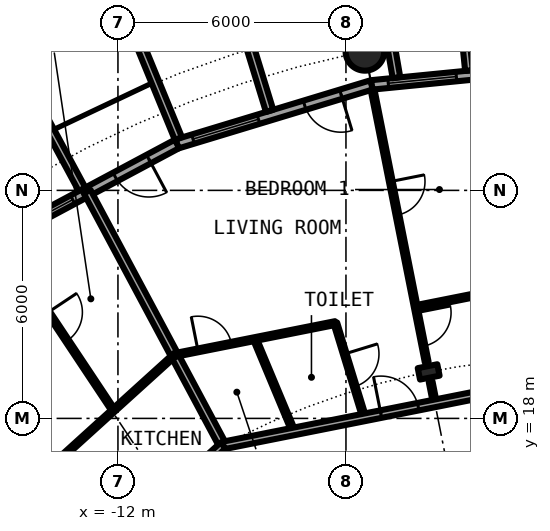
"""IFC4 building model, lengths in metres.
Left out: names, types, materials, properties, quantities, classifications, styles, units other than length and angle.
Written with IfcOpenShell. Run it as: python <this file> out.ifc"""

import sys

from ifc_helpers import new_model, si_unit, direction, frame, frame_2d, origin, origin_2d, place, context, subcontext, project, spatial, rectangle, hollow_circle, i_section, extrude, element, fill, save


model = new_model("IFC4")
c1 = context("Model", 3, precision=1e-05, world=origin(), true_north=direction((0.0, 1.0)))
c2 = subcontext(c1, "Body", "Model", "MODEL_VIEW")
j1 = project(units=[si_unit("LENGTHUNIT", "METRE"), si_unit("PLANEANGLEUNIT", "RADIAN")], contexts=[c1])
p1 = place(None, origin())
s1 = spatial("IfcSite", under=j1, at=p1, CompositionType="ELEMENT")
p2 = place(p1, origin())
s2 = spatial("IfcBuilding", under=s1, at=p2, CompositionType="ELEMENT")
p3 = place(p2, frame((0.0, 0.0, 63.6)))
s3 = spatial("IfcBuildingStorey", under=s2, at=p3, CompositionType="ELEMENT", Elevation=63.6)
p4 = place(p3, frame((-5.501, 27.658, 0.0), z_axis=(0.0, 0.0, 1.0), x_axis=(1.0, 0.0, 0.0)))
e1 = element("IfcColumn", 1, at=p4, inside=s3, PredefinedType="COLUMN", context=c2, shape_type="SweptSolid", body=[
    extrude(hollow_circle(Radius=0.508, WallThickness=0.04, at=origin_2d()), origin(), (0.0, 0.0, 1.0), 3.05),
])
p5 = place(p3, frame((-3.824, 19.223, 0.0), z_axis=(0.0, 0.0, 1.0), x_axis=(-0.195090322016, 0.980785280403, 0.0)))
e2 = element("IfcColumn", 2, at=p5, inside=s3, PredefinedType="COLUMN", context=c2, shape_type="SweptSolid", body=[
    extrude(i_section(OverallWidth=0.306, OverallDepth=0.524, WebThickness=0.021, FlangeThickness=0.04, FilletRadius=0.027, at=origin_2d()), origin(), (0.0, 0.0, 1.0), 3.05),
])
p6 = place(p3, frame((0.0, 27.3, 0.0), z_axis=(0.0, 0.0, 1.0), x_axis=(-0.995173996315, -0.098126026407, 0.0)))
e3 = element("IfcWall", 3, at=p6, inside=s3, PredefinedType="SOLIDWALL", context=c2, shape_type="SweptSolid", body=[
    extrude(rectangle(XDim=5.352, YDim=0.25, at=frame_2d((2.676, 0.0))), origin(), (0.0, 0.0, 1.0), 2.7),
])
p7 = place(p6, frame((0.841, 0.0, 0.0)))
e4 = element("IfcOpeningElement", 4, at=p7, cuts=e3, PredefinedType="OPENING", context=c2, shape_type="SweptSolid", body=[
    extrude(rectangle(XDim=1.0, YDim=2.2, at=frame_2d((0.5, 1.1))), frame((0.0, 0.135, 0.0), z_axis=(0.0, -1.0, 0.0), x_axis=(1.0, 0.0, 0.0)), (0.0, 0.0, 1.0), 0.27),
])
p8 = place(p6, frame((3.111, 0.0, 0.3)))
e5 = element("IfcOpeningElement", 5, at=p8, cuts=e3, PredefinedType="OPENING", context=c2, shape_type="SweptSolid", body=[
    extrude(rectangle(XDim=1.8, YDim=2.1, at=frame_2d((0.9, 1.05))), frame((0.0, 0.135, 0.0), z_axis=(0.0, -1.0, 0.0), x_axis=(1.0, 0.0, 0.0)), (0.0, 0.0, 1.0), 0.27),
])
p9 = place(p3, frame((-2.764, 27.153, -0.03), z_axis=(0.0, 0.0, 1.0), x_axis=(-0.101505487237, 0.994834979311, 0.0)))
e6 = element("IfcWall", 6, at=p9, inside=s3, PredefinedType="SOLIDWALL", context=c2, shape_type="SweptSolid", body=[
    extrude(rectangle(XDim=3.007, YDim=0.2, at=frame_2d((1.503, 0.0))), origin(), (0.0, 0.0, 1.0), 2.73),
])
p10 = place(p3, frame((-4.671, 26.966, -0.03), z_axis=(0.0, 0.0, 1.0), x_axis=(-0.170539878907, 0.985350774954, 0.0)))
e7 = element("IfcWall", 7, at=p10, inside=s3, PredefinedType="SOLIDWALL", context=c2, shape_type="SweptSolid", body=[
    extrude(rectangle(XDim=2.932, YDim=0.2, at=frame_2d((1.466, 0.0))), origin(), (0.0, 0.0, 1.0), 2.73),
])
p11 = place(p3, frame((-5.326, 26.775, 0.0), z_axis=(0.0, 0.0, 1.0), x_axis=(-0.956965678721, -0.290201119486, 0.0)))
e8 = element("IfcWall", 8, at=p11, inside=s3, PredefinedType="SOLIDWALL", context=c2, shape_type="SweptSolid", body=[
    extrude(rectangle(XDim=5.351, YDim=0.25, at=frame_2d((2.676, 0.0))), origin(), (0.0, 0.0, 1.0), 2.7),
])
p12 = place(p11, frame((0.841, 0.0, 0.0)))
e9 = element("IfcOpeningElement", 9, at=p12, cuts=e8, PredefinedType="OPENING", context=c2, shape_type="SweptSolid", body=[
    extrude(rectangle(XDim=1.0, YDim=2.2, at=frame_2d((0.5, 1.1))), frame((0.0, 0.135, 0.0), z_axis=(0.0, -1.0, 0.0), x_axis=(1.0, 0.0, 0.0)), (0.0, 0.0, 1.0), 0.27),
])
p13 = place(p11, frame((3.111, 0.0, 0.3)))
e10 = element("IfcOpeningElement", 10, at=p13, cuts=e8, PredefinedType="OPENING", context=c2, shape_type="SweptSolid", body=[
    extrude(rectangle(XDim=1.8, YDim=2.1, at=frame_2d((0.9, 1.05))), frame((0.0, 0.135, 0.0), z_axis=(0.0, -1.0, 0.0), x_axis=(1.0, 0.0, 0.0)), (0.0, 0.0, 1.0), 0.27),
])
p14 = place(p3, frame((-8.009, 26.092, -0.03), z_axis=(0.0, 0.0, 1.0), x_axis=(-0.293406695073, 0.955987715029, 0.0)))
e11 = element("IfcWall", 11, at=p14, inside=s3, PredefinedType="SOLIDWALL", context=c2, shape_type="SweptSolid", body=[
    extrude(rectangle(XDim=3.006, YDim=0.2, at=frame_2d((1.503, 0.0))), origin(), (0.0, 0.0, 1.0), 2.73),
])
p15 = place(p3, frame((-10.409, 25.364, -0.03), z_axis=(0.0, 0.0, 1.0), x_axis=(-0.379509886562, 0.925187681501, 0.0)))
e12 = element("IfcWall", 12, at=p15, inside=s3, PredefinedType="SOLIDWALL", context=c2, shape_type="SweptSolid", body=[
    extrude(rectangle(XDim=2.883, YDim=0.2, at=frame_2d((1.441, 0.0))), origin(), (0.0, 0.0, 1.0), 2.73),
])
p16 = place(p3, frame((-10.447, 25.222, 0.0), z_axis=(0.0, 0.0, 1.0), x_axis=(-0.881915646801, -0.471407246368, 0.0)))
e13 = element("IfcWall", 13, at=p16, inside=s3, PredefinedType="SOLIDWALL", context=c2, shape_type="SweptSolid", body=[
    extrude(rectangle(XDim=5.352, YDim=0.25, at=frame_2d((2.676, 0.0))), origin(), (0.0, 0.0, 1.0), 2.7),
])
p17 = place(p16, frame((0.841, 0.0, 0.0)))
e14 = element("IfcOpeningElement", 14, at=p17, cuts=e13, PredefinedType="OPENING", context=c2, shape_type="SweptSolid", body=[
    extrude(rectangle(XDim=1.0, YDim=2.2, at=frame_2d((0.5, 1.1))), frame((0.0, 0.135, 0.0), z_axis=(0.0, -1.0, 0.0), x_axis=(1.0, 0.0, 0.0)), (0.0, 0.0, 1.0), 0.27),
])
p18 = place(p16, frame((3.111, 0.0, 0.3)))
e15 = element("IfcOpeningElement", 15, at=p18, cuts=e13, PredefinedType="OPENING", context=c2, shape_type="SweptSolid", body=[
    extrude(rectangle(XDim=1.8, YDim=2.1, at=frame_2d((0.9, 1.05))), frame((0.0, 0.135, 0.0), z_axis=(0.0, -1.0, 0.0), x_axis=(1.0, 0.0, 0.0)), (0.0, 0.0, 1.0), 0.27),
])
p19 = place(p3, frame((-12.945, 24.029, -0.03), z_axis=(0.0, 0.0, 1.0), x_axis=(-0.474424310775, 0.88029629861, 0.0)))
e16 = element("IfcWall", 16, at=p19, inside=s3, PredefinedType="SOLIDWALL", context=c2, shape_type="SweptSolid", body=[
    extrude(rectangle(XDim=3.006, YDim=0.2, at=frame_2d((1.503, 0.0))), origin(), (0.0, 0.0, 1.0), 2.73),
])
p20 = place(p3, frame((-17.219, 21.023, 0.0), z_axis=(0.0, 0.0, 1.0), x_axis=(0.633664062855, -0.773608334654, 0.0)))
e17 = element("IfcWall", 17, at=p20, inside=s3, PredefinedType="PARTITIONING", context=c2, shape_type="SweptSolid", body=[
    extrude(rectangle(XDim=8.138, YDim=0.1, at=frame_2d((4.069, 0.0))), origin(), (0.0, 0.0, 1.0), 2.7),
])
p21 = place(p20, frame((6.377, 0.0, 0.0)))
e18 = element("IfcOpeningElement", 18, at=p21, cuts=e17, PredefinedType="OPENING", context=c2, shape_type="SweptSolid", body=[
    extrude(rectangle(XDim=0.9, YDim=2.3, at=frame_2d((0.45, 1.15))), frame((0.0, 0.06, 0.0), z_axis=(0.0, -1.0, 0.0), x_axis=(1.0, 0.0, 0.0)), (0.0, 0.0, 1.0), 0.12),
])
p22 = place(p20, frame((2.308, 0.0, 0.0)))
e19 = element("IfcOpeningElement", 19, at=p22, cuts=e17, PredefinedType="OPENING", context=c2, shape_type="SweptSolid", body=[
    extrude(rectangle(XDim=0.9, YDim=2.3, at=frame_2d((0.45, 1.15))), frame((0.0, 0.06, 0.0), z_axis=(0.0, -1.0, 0.0), x_axis=(1.0, 0.0, 0.0)), (0.0, 0.0, 1.0), 0.12),
])
p23 = place(p3, frame((-15.054, 22.624, 0.0), z_axis=(0.0, 0.0, 1.0), x_axis=(0.553913391217, -0.832574294, 0.0)))
e20 = element("IfcWall", 20, at=p23, inside=s3, PredefinedType="PARTITIONING", context=c2, shape_type="SweptSolid", body=[
    extrude(rectangle(XDim=5.301, YDim=0.1, at=frame_2d((2.65, 0.0))), origin(), (0.0, 0.0, 1.0), 2.7),
])
p24 = place(p23, frame((2.2, 0.0, 0.0)))
e21 = element("IfcOpeningElement", 21, at=p24, cuts=e20, PredefinedType="OPENING", context=c2, shape_type="SweptSolid", body=[
    extrude(rectangle(XDim=0.9, YDim=2.3, at=frame_2d((0.45, 1.15))), frame((0.0, 0.06, 0.0), z_axis=(0.0, -1.0, 0.0), x_axis=(1.0, 0.0, 0.0)), (0.0, 0.0, 1.0), 0.12),
])
p25 = place(p3, frame((-12.81, 23.966, 0.0), z_axis=(0.0, 0.0, 1.0), x_axis=(0.471439510802, -0.881898399848, 0.0)))
e22 = element("IfcWall", 22, at=p25, inside=s3, PredefinedType="PARTITIONING", context=c2, shape_type="SweptSolid", body=[
    extrude(rectangle(XDim=7.575, YDim=0.2, at=frame_2d((3.787, 0.0))), origin(), (0.0, 0.0, 1.0), 2.7),
])
p26 = place(p3, frame((-8.396, 20.088, 0.0), z_axis=(0.0, 0.0, 1.0), x_axis=(0.385844829344, -0.922563693014, 0.0)))
e23 = element("IfcWall", 23, at=p26, inside=s3, PredefinedType="PARTITIONING", context=c2, shape_type="SweptSolid", body=[
    extrude(rectangle(XDim=2.636, YDim=0.1, at=frame_2d((1.318, 0.0))), origin(), (0.0, 0.0, 1.0), 2.7),
])
p27 = place(p3, frame((-5.301, 26.653, 0.0), z_axis=(0.0, 0.0, 1.0), x_axis=(0.194986141751, -0.980805997395, 0.0)))
e24 = element("IfcWall", 24, at=p27, inside=s3, PredefinedType="PARTITIONING", context=c2, shape_type="SweptSolid", body=[
    extrude(rectangle(XDim=7.313, YDim=0.1, at=frame_2d((3.657, 0.0))), origin(), (0.0, 0.0, 1.0), 2.7),
])
p28 = place(p27, frame((5.985, 0.0, 0.0)))
e25 = element("IfcOpeningElement", 25, at=p28, cuts=e24, PredefinedType="OPENING", context=c2, shape_type="SweptSolid", body=[
    extrude(rectangle(XDim=0.9, YDim=2.3, at=frame_2d((0.45, 1.15))), frame((0.0, 0.06, 0.0), z_axis=(0.0, -1.0, 0.0), x_axis=(1.0, 0.0, 0.0)), (0.0, 0.0, 1.0), 0.12),
])
p29 = place(p27, frame((2.467, 0.0, 0.0)))
e26 = element("IfcOpeningElement", 26, at=p29, cuts=e24, PredefinedType="OPENING", context=c2, shape_type="SweptSolid", body=[
    extrude(rectangle(XDim=0.9, YDim=2.3, at=frame_2d((0.45, 1.15))), frame((0.0, 0.06, 0.0), z_axis=(0.0, -1.0, 0.0), x_axis=(1.0, 0.0, 0.0)), (0.0, 0.0, 1.0), 0.12),
])
p30 = place(p3, frame((-3.772, 18.966, 0.0), z_axis=(0.0, 0.0, 1.0), x_axis=(0.194500150765, -0.980902488198, 0.0)))
e27 = element("IfcWall", 27, at=p30, inside=s3, PredefinedType="PARTITIONING", context=c2, shape_type="SweptSolid", body=[
    extrude(rectangle(XDim=0.581, YDim=0.1, at=frame_2d((0.291, 0.0))), origin(), (0.0, 0.0, 1.0), 2.7),
])
p31 = place(p3, frame((-6.28, 20.509, 0.0), z_axis=(0.0, 0.0, 1.0), x_axis=(0.293008940941, -0.956109701095, 0.0)))
e28 = element("IfcWall", 28, at=p31, inside=s3, PredefinedType="PARTITIONING", context=c2, shape_type="SweptSolid", body=[
    extrude(rectangle(XDim=2.597, YDim=0.1, at=frame_2d((1.299, 0.0))), origin(), (0.0, 0.0, 1.0), 2.7),
])
p32 = place(p31, frame((0.849, 0.0, 0.0)))
e29 = element("IfcOpeningElement", 29, at=p32, cuts=e28, PredefinedType="OPENING", context=c2, shape_type="SweptSolid", body=[
    extrude(rectangle(XDim=0.9, YDim=2.3, at=frame_2d((0.45, 1.15))), frame((0.0, 0.06, 0.0), z_axis=(0.0, -1.0, 0.0), x_axis=(1.0, 0.0, 0.0)), (0.0, 0.0, 1.0), 0.12),
])
p33 = place(p3, frame((-9.239, 17.286, 0.0), z_axis=(0.0, 0.0, 1.0), x_axis=(0.98077905287, 0.195121627328, 0.0)))
e30 = element("IfcWall", 30, at=p33, inside=s3, PredefinedType="PARTITIONING", context=c2, shape_type="SweptSolid", body=[
    extrude(rectangle(XDim=11.379, YDim=0.2, at=frame_2d((5.689, 0.0))), origin(), (0.0, 0.0, 1.0), 2.38),
])
p34 = place(p33, frame((4.241, 0.0, 0.0)))
e31 = element("IfcOpeningElement", 31, at=p34, cuts=e30, PredefinedType="OPENING", context=c2, shape_type="SweptSolid", body=[
    extrude(rectangle(XDim=1.0, YDim=2.3, at=frame_2d((0.5, 1.15))), frame((0.0, 0.11, 0.0), z_axis=(0.0, -1.0, 0.0), x_axis=(1.0, 0.0, 0.0)), (0.0, 0.0, 1.0), 0.22),
])
p35 = place(p3, frame((-16.18, 10.995, 0.0), z_axis=(0.0, 0.0, 1.0), x_axis=(0.741086986457, 0.671409024741, 0.0)))
e32 = element("IfcWall", 32, at=p35, inside=s3, PredefinedType="PARTITIONING", context=c2, shape_type="SweptSolid", body=[
    extrude(rectangle(XDim=9.373, YDim=0.2, at=frame_2d((4.687, 0.0))), origin(), (0.0, 0.0, 1.0), 2.38),
])
p36 = place(p35, frame((4.115, 0.0, 0.0)))
e33 = element("IfcOpeningElement", 33, at=p36, cuts=e32, PredefinedType="OPENING", context=c2, shape_type="SweptSolid", body=[
    extrude(rectangle(XDim=1.0, YDim=2.3, at=frame_2d((0.5, 1.15))), frame((0.0, 0.11, 0.0), z_axis=(0.0, -1.0, 0.0), x_axis=(1.0, 0.0, 0.0)), (0.0, 0.0, 1.0), 0.22),
])
p37 = place(p3, frame((-10.511, 19.667, 0.0), z_axis=(0.0, 0.0, 1.0), x_axis=(0.980773878384, 0.195147635084, 0.0)))
e34 = element("IfcWall", 34, at=p37, inside=s3, PredefinedType="PARTITIONING", context=c2, shape_type="SweptSolid", body=[
    extrude(rectangle(XDim=4.315, YDim=0.1, at=frame_2d((2.157, 0.0))), origin(), (0.0, 0.0, 1.0), 2.7),
])
p38 = place(p37, frame((0.628, 0.0, 0.0)))
e35 = element("IfcOpeningElement", 35, at=p38, cuts=e34, PredefinedType="OPENING", context=c2, shape_type="SweptSolid", body=[
    extrude(rectangle(XDim=0.9, YDim=2.3, at=frame_2d((0.45, 1.15))), frame((0.0, 0.06, 0.0), z_axis=(0.0, -1.0, 0.0), x_axis=(1.0, 0.0, 0.0)), (0.0, 0.0, 1.0), 0.12),
])
p39 = place(p3, frame((-4.163, 20.93, 0.0), z_axis=(0.0, 0.0, 1.0), x_axis=(0.98077745026, 0.195129682675, 0.0)))
e36 = element("IfcWall", 36, at=p39, inside=s3, PredefinedType="PARTITIONING", context=c2, shape_type="SweptSolid", body=[
    extrude(rectangle(XDim=6.474, YDim=0.1, at=frame_2d((3.237, 0.0))), origin(), (0.0, 0.0, 1.0), 2.7),
])
p40 = place(p3, frame((-13.724, 16.755, 0.0), z_axis=(0.0, 0.0, 1.0), x_axis=(0.741022791884, 0.671479874537, 0.0)))
e37 = element("IfcWall", 37, at=p40, inside=s3, PredefinedType="PARTITIONING", context=c2, shape_type="SweptSolid", body=[
    extrude(rectangle(XDim=4.343, YDim=0.1, at=frame_2d((2.171, 0.0))), origin(), (0.0, 0.0, 1.0), 2.7),
])
p41 = place(p8, origin())
e38 = element("IfcWindow", 38, at=p41, inside=s3, PartitioningType="SINGLE_PANEL", PredefinedType="WINDOW", context=c2, shape_type="SweptSolid", body=[
    extrude(rectangle(XDim=1.8, YDim=2.1, at=frame_2d((0.9, 1.05))), frame((0.0, 0.03, 0.0), z_axis=(0.0, -1.0, 0.0), x_axis=(1.0, 0.0, 0.0)), (0.0, 0.0, 1.0), 0.06),
])
fill(e5, e38)
p42 = place(p12, origin())
e39 = element("IfcDoor", 39, at=p42, inside=s3, OperationType="SINGLE_SWING_LEFT", PredefinedType="DOOR", context=c2, shape_type="SweptSolid", body=[
    extrude(rectangle(XDim=1.0, YDim=2.2, at=frame_2d((0.5, 1.1))), frame((0.0, 0.025, 0.0), z_axis=(0.0, -1.0, 0.0), x_axis=(1.0, 0.0, 0.0)), (0.0, 0.0, 1.0), 0.05),
])
fill(e9, e39)
p43 = place(p13, origin())
e40 = element("IfcWindow", 40, at=p43, inside=s3, PartitioningType="SINGLE_PANEL", PredefinedType="WINDOW", context=c2, shape_type="SweptSolid", body=[
    extrude(rectangle(XDim=1.8, YDim=2.1, at=frame_2d((0.9, 1.05))), frame((0.0, 0.03, 0.0), z_axis=(0.0, -1.0, 0.0), x_axis=(1.0, 0.0, 0.0)), (0.0, 0.0, 1.0), 0.06),
])
fill(e10, e40)
p44 = place(p17, origin())
e41 = element("IfcDoor", 41, at=p44, inside=s3, OperationType="SINGLE_SWING_LEFT", PredefinedType="DOOR", context=c2, shape_type="SweptSolid", body=[
    extrude(rectangle(XDim=1.0, YDim=2.2, at=frame_2d((0.5, 1.1))), frame((0.0, 0.025, 0.0), z_axis=(0.0, -1.0, 0.0), x_axis=(1.0, 0.0, 0.0)), (0.0, 0.0, 1.0), 0.05),
])
fill(e14, e41)
p45 = place(p18, origin())
e42 = element("IfcWindow", 42, at=p45, inside=s3, PartitioningType="SINGLE_PANEL", PredefinedType="WINDOW", context=c2, shape_type="SweptSolid", body=[
    extrude(rectangle(XDim=1.8, YDim=2.1, at=frame_2d((0.9, 1.05))), frame((0.0, 0.03, 0.0), z_axis=(0.0, -1.0, 0.0), x_axis=(1.0, 0.0, 0.0)), (0.0, 0.0, 1.0), 0.06),
])
fill(e15, e42)
p46 = place(p34, origin())
e43 = element("IfcDoor", 43, at=p46, inside=s3, OperationType="SINGLE_SWING_LEFT", PredefinedType="DOOR", context=c2, shape_type="SweptSolid", body=[
    extrude(rectangle(XDim=1.0, YDim=2.3, at=frame_2d((0.5, 1.15))), frame((0.0, 0.025, 0.0), z_axis=(0.0, -1.0, 0.0), x_axis=(1.0, 0.0, 0.0)), (0.0, 0.0, 1.0), 0.05),
])
fill(e31, e43)
p47 = place(p38, origin())
e44 = element("IfcDoor", 44, at=p47, inside=s3, OperationType="SINGLE_SWING_LEFT", PredefinedType="DOOR", context=c2, shape_type="SweptSolid", body=[
    extrude(rectangle(XDim=0.9, YDim=2.3, at=frame_2d((0.45, 1.15))), frame((0.0, 0.025, 0.0), z_axis=(0.0, -1.0, 0.0), x_axis=(1.0, 0.0, 0.0)), (0.0, 0.0, 1.0), 0.05),
])
fill(e35, e44)
p48 = place(p32, origin())
e45 = element("IfcDoor", 45, at=p48, inside=s3, OperationType="SINGLE_SWING_LEFT", PredefinedType="DOOR", context=c2, shape_type="SweptSolid", body=[
    extrude(rectangle(XDim=0.9, YDim=2.3, at=frame_2d((0.45, 1.15))), frame((0.0, 0.025, 0.0), z_axis=(0.0, -1.0, 0.0), x_axis=(1.0, 0.0, 0.0)), (0.0, 0.0, 1.0), 0.05),
])
fill(e29, e45)
p49 = place(p28, origin())
e46 = element("IfcDoor", 46, at=p49, inside=s3, OperationType="SINGLE_SWING_RIGHT", PredefinedType="DOOR", context=c2, shape_type="SweptSolid", body=[
    extrude(rectangle(XDim=0.9, YDim=2.3, at=frame_2d((0.45, 1.15))), frame((0.0, 0.025, 0.0), z_axis=(0.0, -1.0, 0.0), x_axis=(1.0, 0.0, 0.0)), (0.0, 0.0, 1.0), 0.05),
])
fill(e25, e46)
p50 = place(p29, origin())
e47 = element("IfcDoor", 47, at=p50, inside=s3, OperationType="SINGLE_SWING_LEFT", PredefinedType="DOOR", context=c2, shape_type="SweptSolid", body=[
    extrude(rectangle(XDim=0.9, YDim=2.3, at=frame_2d((0.45, 1.15))), frame((0.0, 0.025, 0.0), z_axis=(0.0, -1.0, 0.0), x_axis=(1.0, 0.0, 0.0)), (0.0, 0.0, 1.0), 0.05),
])
fill(e26, e47)
p51 = place(p24, origin())
e48 = element("IfcDoor", 48, at=p51, inside=s3, OperationType="SINGLE_SWING_LEFT", PredefinedType="DOOR", context=c2, shape_type="SweptSolid", body=[
    extrude(rectangle(XDim=0.9, YDim=2.3, at=frame_2d((0.45, 1.15))), frame((0.0, 0.025, 0.0), z_axis=(0.0, -1.0, 0.0), x_axis=(1.0, 0.0, 0.0)), (0.0, 0.0, 1.0), 0.05),
])
fill(e21, e48)
save(model, sys.argv[1])
